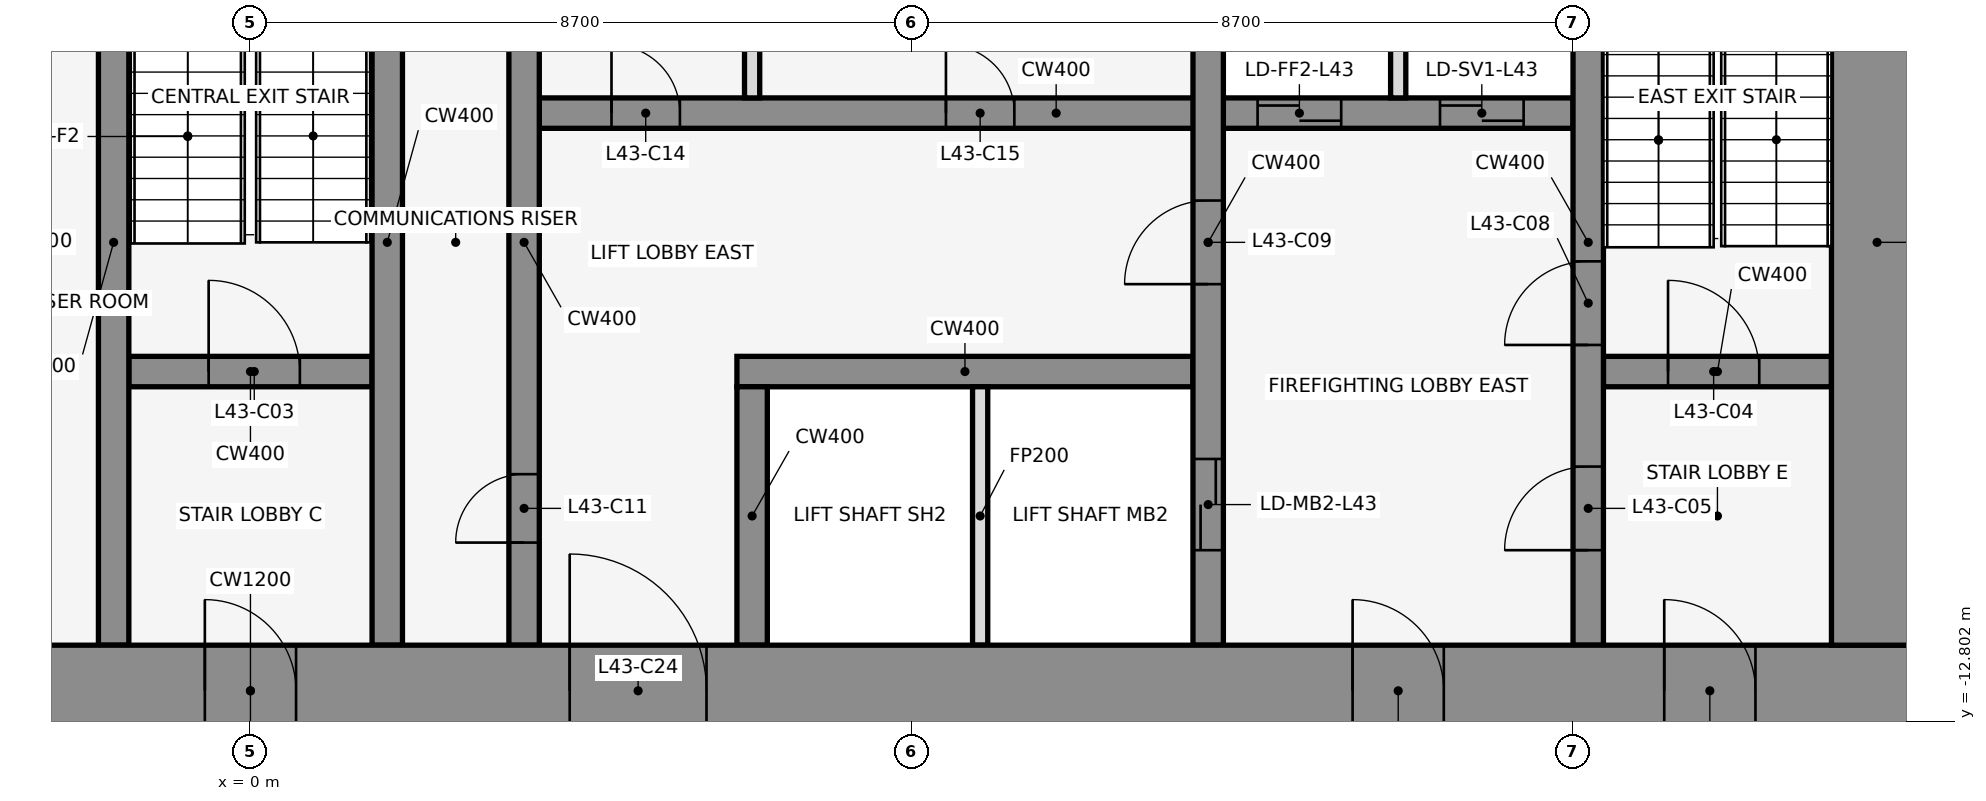
"""IFC4 building model, lengths in metres.
Left out: names, types, materials, properties, quantities, classifications, styles, units other than length and angle.
Written with IfcOpenShell. Run it as: python <this file> out.ifc"""

import sys

from ifc_helpers import new_model, si_unit, direction, frame, frame_2d, origin, place, context, subcontext, project, spatial, rectangle, extrude, element, fill, save


model = new_model("IFC4")
c1 = context("Model", 3, precision=1e-05, world=origin(), true_north=direction((0.0, 1.0)))
c2 = subcontext(c1, "Body", "Model", "MODEL_VIEW")
j1 = project(units=[si_unit("LENGTHUNIT", "METRE"), si_unit("PLANEANGLEUNIT", "RADIAN")], contexts=[c1])
p1 = place(None, origin())
s1 = spatial("IfcSite", under=j1, at=p1, CompositionType="ELEMENT")
p2 = place(p1, origin())
s2 = spatial("IfcBuilding", under=s1, at=p2, CompositionType="ELEMENT")
p3 = place(p2, frame((0.0, 0.0, 195.0)))
s3 = spatial("IfcBuildingStorey", under=s2, at=p3, CompositionType="ELEMENT", Elevation=195.0)
p4 = place(p3, frame((-1.6, -8.2, 0.0), z_axis=(0.0, 0.0, 1.0), x_axis=(1.0, 0.0, 0.0)))
e1 = element("IfcWall", 1, at=p4, inside=s3, PredefinedType="SHEAR", context=c2, shape_type="SweptSolid", body=[
    extrude(rectangle(XDim=3.2, YDim=0.4, at=frame_2d((1.6, 0.0))), origin(), (0.0, 0.0, 1.0), 4.1),
])
p5 = place(p4, frame((1.05, 0.0, 0.0)))
e2 = element("IfcOpeningElement", 2, at=p5, cuts=e1, PredefinedType="OPENING", context=c2, shape_type="SweptSolid", body=[
    extrude(rectangle(XDim=1.2, YDim=2.1, at=frame_2d((0.6, 1.05))), frame((0.0, 0.212, 0.0), z_axis=(0.0, -1.0, 0.0), x_axis=(1.0, 0.0, 0.0)), (0.0, 0.0, 1.0), 0.424),
])
p6 = place(p3, frame((6.4, -8.2, 0.0), z_axis=(0.0, 0.0, 1.0), x_axis=(1.0, 0.0, 0.0)))
e3 = element("IfcWall", 3, at=p6, inside=s3, PredefinedType="SHEAR", context=c2, shape_type="SweptSolid", body=[
    extrude(rectangle(XDim=6.0, YDim=0.4, at=frame_2d((3.0, 0.0))), origin(), (0.0, 0.0, 1.0), 4.1),
])
p7 = place(p3, frame((17.8, -8.2, 0.0), z_axis=(0.0, 0.0, 1.0), x_axis=(1.0, 0.0, 0.0)))
e4 = element("IfcWall", 4, at=p7, inside=s3, PredefinedType="SHEAR", context=c2, shape_type="SweptSolid", body=[
    extrude(rectangle(XDim=3.0, YDim=0.4, at=frame_2d((1.5, 0.0))), origin(), (0.0, 0.0, 1.0), 4.1),
])
p8 = place(p7, frame((0.85, 0.0, 0.0)))
e5 = element("IfcOpeningElement", 5, at=p8, cuts=e4, PredefinedType="OPENING", context=c2, shape_type="SweptSolid", body=[
    extrude(rectangle(XDim=1.2, YDim=2.1, at=frame_2d((0.6, 1.05))), frame((0.0, 0.212, 0.0), z_axis=(0.0, -1.0, 0.0), x_axis=(1.0, 0.0, 0.0)), (0.0, 0.0, 1.0), 0.424),
])
p9 = place(p3, frame((3.8, -4.8, 0.0), z_axis=(0.0, 0.0, 1.0), x_axis=(1.0, 0.0, 0.0)))
e6 = element("IfcWall", 6, at=p9, inside=s3, PredefinedType="SHEAR", context=c2, shape_type="SweptSolid", body=[
    extrude(rectangle(XDim=13.6, YDim=0.4, at=frame_2d((6.8, 0.0))), origin(), (0.0, 0.0, 1.0), 4.1),
])
p10 = place(p9, frame((9.45, 0.0, 0.0)))
e7 = element("IfcOpeningElement", 7, at=p10, cuts=e6, PredefinedType="OPENING", context=c2, shape_type="SweptSolid", body=[
    extrude(rectangle(XDim=1.1, YDim=2.1, at=frame_2d((0.55, 1.05))), frame((0.0, 0.212, 0.0), z_axis=(0.0, -1.0, 0.0), x_axis=(1.0, 0.0, 0.0)), (0.0, 0.0, 1.0), 0.424),
])
p11 = place(p9, frame((11.85, 0.0, 0.0)))
e8 = element("IfcOpeningElement", 8, at=p11, cuts=e6, PredefinedType="OPENING", context=c2, shape_type="SweptSolid", body=[
    extrude(rectangle(XDim=1.1, YDim=2.1, at=frame_2d((0.55, 1.05))), frame((0.0, 0.212, 0.0), z_axis=(0.0, -1.0, 0.0), x_axis=(1.0, 0.0, 0.0)), (0.0, 0.0, 1.0), 0.424),
])
p12 = place(p9, frame((0.95, 0.0, 0.0)))
e9 = element("IfcOpeningElement", 9, at=p12, cuts=e6, PredefinedType="OPENING", context=c2, shape_type="SweptSolid", body=[
    extrude(rectangle(XDim=0.9, YDim=2.1, at=frame_2d((0.45, 1.05))), frame((0.0, 0.212, 0.0), z_axis=(0.0, -1.0, 0.0), x_axis=(1.0, 0.0, 0.0)), (0.0, 0.0, 1.0), 0.424),
])
p13 = place(p9, frame((5.35, 0.0, 0.0)))
e10 = element("IfcOpeningElement", 10, at=p13, cuts=e6, PredefinedType="OPENING", context=c2, shape_type="SweptSolid", body=[
    extrude(rectangle(XDim=0.9, YDim=2.1, at=frame_2d((0.45, 1.05))), frame((0.0, 0.212, 0.0), z_axis=(0.0, -1.0, 0.0), x_axis=(1.0, 0.0, 0.0)), (0.0, 0.0, 1.0), 0.424),
])
for number, where, z_axis, x_axis in (
    (11, (-1.8, -11.8, 0.0), (0.0, 0.0, 1.0), (0.0, 1.0, 0.0)),
    (12, (1.8, -11.8, 0.0), (0.0, 0.0, 1.0), (0.0, 1.0, 0.0)),
):
    element("IfcWall", number, at=place(p3, frame(where, z_axis=z_axis, x_axis=x_axis)), inside=s3, PredefinedType="SHEAR", context=c2, shape_type="SweptSolid", body=[
        extrude(rectangle(XDim=10.6, YDim=0.4, at=frame_2d((5.3, 0.0))), origin(), (0.0, 0.0, 1.0), 4.1),
    ])
p14 = place(p3, frame((3.6, -11.8, 0.0), z_axis=(0.0, 0.0, 1.0), x_axis=(0.0, 1.0, 0.0)))
e13 = element("IfcWall", 13, at=p14, inside=s3, PredefinedType="SHEAR", context=c2, shape_type="SweptSolid", body=[
    extrude(rectangle(XDim=10.6, YDim=0.4, at=frame_2d((5.3, 0.0))), origin(), (0.0, 0.0, 1.0), 4.1),
])
p15 = place(p14, frame((1.35, 0.0, 0.0)))
e14 = element("IfcOpeningElement", 14, at=p15, cuts=e13, PredefinedType="OPENING", context=c2, shape_type="SweptSolid", body=[
    extrude(rectangle(XDim=0.9, YDim=2.1, at=frame_2d((0.45, 1.05))), frame((0.0, 0.212, 0.0), z_axis=(0.0, -1.0, 0.0), x_axis=(1.0, 0.0, 0.0)), (0.0, 0.0, 1.0), 0.424),
])
p16 = place(p3, frame((6.6, -11.8, 0.0), z_axis=(0.0, 0.0, 1.0), x_axis=(0.0, 1.0, 0.0)))
e15 = element("IfcWall", 15, at=p16, inside=s3, PredefinedType="SHEAR", context=c2, shape_type="SweptSolid", body=[
    extrude(rectangle(XDim=3.4, YDim=0.4, at=frame_2d((1.7, 0.0))), origin(), (0.0, 0.0, 1.0), 4.1),
])
for number, where, z_axis, x_axis in (
    (16, (6.6, -4.6, 0.0), (0.0, 0.0, 1.0), (0.0, 1.0, 0.0)),
    (17, (9.6, -11.8, 0.0), (0.0, 0.0, 1.0), (0.0, 1.0, 0.0)),
):
    element("IfcWall", number, at=place(p3, frame(where, z_axis=z_axis, x_axis=x_axis)), inside=s3, PredefinedType="PARTITIONING", context=c2, shape_type="SweptSolid", body=[
        extrude(rectangle(XDim=3.4, YDim=0.2, at=frame_2d((1.7, 0.0))), origin(), (0.0, 0.0, 1.0), 2.84),
    ])
p17 = place(p3, frame((12.6, -11.8, 0.0), z_axis=(0.0, 0.0, 1.0), x_axis=(0.0, 1.0, 0.0)))
e18 = element("IfcWall", 18, at=p17, inside=s3, PredefinedType="SHEAR", context=c2, shape_type="SweptSolid", body=[
    extrude(rectangle(XDim=10.6, YDim=0.4, at=frame_2d((5.3, 0.0))), origin(), (0.0, 0.0, 1.0), 4.1),
])
p18 = place(p17, frame((1.25, 0.0, 0.0)))
e19 = element("IfcOpeningElement", 19, at=p18, cuts=e18, PredefinedType="OPENING", context=c2, shape_type="SweptSolid", body=[
    extrude(rectangle(XDim=1.2, YDim=2.1, at=frame_2d((0.6, 1.05))), frame((0.0, 0.212, 0.0), z_axis=(0.0, -1.0, 0.0), x_axis=(1.0, 0.0, 0.0)), (0.0, 0.0, 1.0), 0.424),
])
p19 = place(p17, frame((4.75, 0.0, 0.0)))
e20 = element("IfcOpeningElement", 20, at=p19, cuts=e18, PredefinedType="OPENING", context=c2, shape_type="SweptSolid", body=[
    extrude(rectangle(XDim=1.1, YDim=2.1, at=frame_2d((0.55, 1.05))), frame((0.0, 0.212, 0.0), z_axis=(0.0, -1.0, 0.0), x_axis=(1.0, 0.0, 0.0)), (0.0, 0.0, 1.0), 0.424),
])
p20 = place(p3, frame((15.1, -4.6, 0.0), z_axis=(0.0, 0.0, 1.0), x_axis=(0.0, 1.0, 0.0)))
e21 = element("IfcWall", 21, at=p20, inside=s3, PredefinedType="PARTITIONING", context=c2, shape_type="SweptSolid", body=[
    extrude(rectangle(XDim=3.4, YDim=0.2, at=frame_2d((1.7, 0.0))), origin(), (0.0, 0.0, 1.0), 2.84),
])
p21 = place(p3, frame((17.6, -11.8, 0.0), z_axis=(0.0, 0.0, 1.0), x_axis=(0.0, 1.0, 0.0)))
e22 = element("IfcWall", 22, at=p21, inside=s3, PredefinedType="SHEAR", context=c2, shape_type="SweptSolid", body=[
    extrude(rectangle(XDim=10.6, YDim=0.4, at=frame_2d((5.3, 0.0))), origin(), (0.0, 0.0, 1.0), 4.1),
])
p22 = place(p21, frame((1.25, 0.0, 0.0)))
e23 = element("IfcOpeningElement", 23, at=p22, cuts=e22, PredefinedType="OPENING", context=c2, shape_type="SweptSolid", body=[
    extrude(rectangle(XDim=1.1, YDim=2.1, at=frame_2d((0.55, 1.05))), frame((0.0, 0.212, 0.0), z_axis=(0.0, -1.0, 0.0), x_axis=(1.0, 0.0, 0.0)), (0.0, 0.0, 1.0), 0.424),
])
p23 = place(p21, frame((3.95, 0.0, 0.0)))
e24 = element("IfcOpeningElement", 24, at=p23, cuts=e22, PredefinedType="OPENING", context=c2, shape_type="SweptSolid", body=[
    extrude(rectangle(XDim=1.1, YDim=2.1, at=frame_2d((0.55, 1.05))), frame((0.0, 0.212, 0.0), z_axis=(0.0, -1.0, 0.0), x_axis=(1.0, 0.0, 0.0)), (0.0, 0.0, 1.0), 0.424),
])
p24 = place(p3, frame((-22.0, -12.4, 0.0), z_axis=(0.0, 0.0, 1.0), x_axis=(1.0, 0.0, 0.0)))
e25 = element("IfcWall", 25, at=p24, inside=s3, PredefinedType="SHEAR", context=c2, shape_type="SweptSolid", body=[
    extrude(rectangle(XDim=44.0, YDim=1.2, at=frame_2d((22.0, 0.0))), origin(), (0.0, 0.0, 1.0), 4.1),
])
p25 = place(p24, frame((2.2, 0.0, 0.0)))
e26 = element("IfcOpeningElement", 26, at=p25, cuts=e25, PredefinedType="OPENING", context=c2, shape_type="SweptSolid", body=[
    extrude(rectangle(XDim=1.2, YDim=2.1, at=frame_2d((0.6, 1.05))), frame((0.0, 0.612, 0.0), z_axis=(0.0, -1.0, 0.0), x_axis=(1.0, 0.0, 0.0)), (0.0, 0.0, 1.0), 1.224),
])
p26 = place(p24, frame((21.4, 0.0, 0.0)))
e27 = element("IfcOpeningElement", 27, at=p26, cuts=e25, PredefinedType="OPENING", context=c2, shape_type="SweptSolid", body=[
    extrude(rectangle(XDim=1.2, YDim=2.1, at=frame_2d((0.6, 1.05))), frame((0.0, 0.612, 0.0), z_axis=(0.0, -1.0, 0.0), x_axis=(1.0, 0.0, 0.0)), (0.0, 0.0, 1.0), 1.224),
])
p27 = place(p24, frame((40.6, 0.0, 0.0)))
e28 = element("IfcOpeningElement", 28, at=p27, cuts=e25, PredefinedType="OPENING", context=c2, shape_type="SweptSolid", body=[
    extrude(rectangle(XDim=1.2, YDim=2.1, at=frame_2d((0.6, 1.05))), frame((0.0, 0.612, 0.0), z_axis=(0.0, -1.0, 0.0), x_axis=(1.0, 0.0, 0.0)), (0.0, 0.0, 1.0), 1.224),
])
p28 = place(p24, frame((16.0, 0.0, 0.0)))
e29 = element("IfcOpeningElement", 29, at=p28, cuts=e25, PredefinedType="OPENING", context=c2, shape_type="SweptSolid", body=[
    extrude(rectangle(XDim=1.8, YDim=2.1, at=frame_2d((0.9, 1.05))), frame((0.0, 0.612, 0.0), z_axis=(0.0, -1.0, 0.0), x_axis=(1.0, 0.0, 0.0)), (0.0, 0.0, 1.0), 1.224),
])
p29 = place(p24, frame((6.3, 0.0, 0.0)))
e30 = element("IfcOpeningElement", 30, at=p29, cuts=e25, PredefinedType="OPENING", context=c2, shape_type="SweptSolid", body=[
    extrude(rectangle(XDim=1.2, YDim=2.1, at=frame_2d((0.6, 1.05))), frame((0.0, 0.612, 0.0), z_axis=(0.0, -1.0, 0.0), x_axis=(1.0, 0.0, 0.0)), (0.0, 0.0, 1.0), 1.224),
])
p30 = place(p24, frame((26.2, 0.0, 0.0)))
e31 = element("IfcOpeningElement", 31, at=p30, cuts=e25, PredefinedType="OPENING", context=c2, shape_type="SweptSolid", body=[
    extrude(rectangle(XDim=1.8, YDim=2.1, at=frame_2d((0.9, 1.05))), frame((0.0, 0.612, 0.0), z_axis=(0.0, -1.0, 0.0), x_axis=(1.0, 0.0, 0.0)), (0.0, 0.0, 1.0), 1.224),
])
p31 = place(p24, frame((36.5, 0.0, 0.0)))
e32 = element("IfcOpeningElement", 32, at=p31, cuts=e25, PredefinedType="OPENING", context=c2, shape_type="SweptSolid", body=[
    extrude(rectangle(XDim=1.2, YDim=2.1, at=frame_2d((0.6, 1.05))), frame((0.0, 0.612, 0.0), z_axis=(0.0, -1.0, 0.0), x_axis=(1.0, 0.0, 0.0)), (0.0, 0.0, 1.0), 1.224),
])
p32 = place(p3, frame((21.4, -11.8, 0.0), z_axis=(0.0, 0.0, 1.0), x_axis=(0.0, 1.0, 0.0)))
e33 = element("IfcWall", 33, at=p32, inside=s3, PredefinedType="SHEAR", context=c2, shape_type="SweptSolid", body=[
    extrude(rectangle(XDim=10.6, YDim=1.2, at=frame_2d((5.3, 0.0))), origin(), (0.0, 0.0, 1.0), 4.1),
])
p33 = place(p5, origin())
e34 = element("IfcDoor", 34, at=p33, inside=s3, OperationType="SINGLE_SWING_LEFT", PredefinedType="DOOR", context=c2, shape_type="SweptSolid", body=[
    extrude(rectangle(XDim=1.2, YDim=2.1, at=frame_2d((0.6, 1.05))), frame((0.0, 0.025, 0.0), z_axis=(0.0, -1.0, 0.0), x_axis=(1.0, 0.0, 0.0)), (0.0, 0.0, 1.0), 0.05),
])
fill(e2, e34)
p34 = place(p8, origin())
e35 = element("IfcDoor", 35, at=p34, inside=s3, OperationType="SINGLE_SWING_RIGHT", PredefinedType="DOOR", context=c2, shape_type="SweptSolid", body=[
    extrude(rectangle(XDim=1.2, YDim=2.1, at=frame_2d((0.6, 1.05))), frame((0.0, 0.025, 0.0), z_axis=(0.0, -1.0, 0.0), x_axis=(1.0, 0.0, 0.0)), (0.0, 0.0, 1.0), 0.05),
])
fill(e5, e35)
p35 = place(p22, origin())
e36 = element("IfcDoor", 36, at=p35, inside=s3, OperationType="SINGLE_SWING_LEFT", PredefinedType="DOOR", context=c2, shape_type="SweptSolid", body=[
    extrude(rectangle(XDim=1.1, YDim=2.1, at=frame_2d((0.55, 1.05))), frame((0.0, 0.025, 0.0), z_axis=(0.0, -1.0, 0.0), x_axis=(1.0, 0.0, 0.0)), (0.0, 0.0, 1.0), 0.05),
])
fill(e23, e36)
p36 = place(p18, origin())
e37 = element("IfcDoor", 37, at=p36, inside=s3, OperationType="DOUBLE_DOOR_SLIDING", PredefinedType="DOOR", context=c2, shape_type="SweptSolid", body=[
    extrude(rectangle(XDim=1.2, YDim=2.1, at=frame_2d((0.6, 1.05))), frame((0.0, 0.025, 0.0), z_axis=(0.0, -1.0, 0.0), x_axis=(1.0, 0.0, 0.0)), (0.0, 0.0, 1.0), 0.05),
])
fill(e19, e37)
p37 = place(p10, origin())
e38 = element("IfcDoor", 38, at=p37, inside=s3, OperationType="DOUBLE_DOOR_SLIDING", PredefinedType="DOOR", context=c2, shape_type="SweptSolid", body=[
    extrude(rectangle(XDim=1.1, YDim=2.1, at=frame_2d((0.55, 1.05))), frame((0.0, 0.025, 0.0), z_axis=(0.0, -1.0, 0.0), x_axis=(1.0, 0.0, 0.0)), (0.0, 0.0, 1.0), 0.05),
])
fill(e7, e38)
p38 = place(p11, origin())
e39 = element("IfcDoor", 39, at=p38, inside=s3, OperationType="DOUBLE_DOOR_SLIDING", PredefinedType="DOOR", context=c2, shape_type="SweptSolid", body=[
    extrude(rectangle(XDim=1.1, YDim=2.1, at=frame_2d((0.55, 1.05))), frame((0.0, 0.025, 0.0), z_axis=(0.0, -1.0, 0.0), x_axis=(1.0, 0.0, 0.0)), (0.0, 0.0, 1.0), 0.05),
])
fill(e8, e39)
p39 = place(p23, origin())
e40 = element("IfcDoor", 40, at=p39, inside=s3, OperationType="SINGLE_SWING_RIGHT", PredefinedType="DOOR", context=c2, shape_type="SweptSolid", body=[
    extrude(rectangle(XDim=1.1, YDim=2.1, at=frame_2d((0.55, 1.05))), frame((0.0, 0.025, 0.0), z_axis=(0.0, -1.0, 0.0), x_axis=(1.0, 0.0, 0.0)), (0.0, 0.0, 1.0), 0.05),
])
fill(e24, e40)
p40 = place(p19, frame((1.1, 0.0, 0.0), z_axis=(0.0, 0.0, 1.0), x_axis=(-1.0, 0.0, 0.0)))
e41 = element("IfcDoor", 41, at=p40, inside=s3, OperationType="SINGLE_SWING_RIGHT", PredefinedType="DOOR", context=c2, shape_type="SweptSolid", body=[
    extrude(rectangle(XDim=1.1, YDim=2.1, at=frame_2d((0.55, 1.05))), frame((0.0, 0.025, 0.0), z_axis=(0.0, -1.0, 0.0), x_axis=(1.0, 0.0, 0.0)), (0.0, 0.0, 1.0), 0.05),
])
fill(e20, e41)
p41 = place(p15, origin())
e42 = element("IfcDoor", 42, at=p41, inside=s3, OperationType="SINGLE_SWING_LEFT", PredefinedType="DOOR", context=c2, shape_type="SweptSolid", body=[
    extrude(rectangle(XDim=0.9, YDim=2.1, at=frame_2d((0.45, 1.05))), frame((0.0, 0.025, 0.0), z_axis=(0.0, -1.0, 0.0), x_axis=(1.0, 0.0, 0.0)), (0.0, 0.0, 1.0), 0.05),
])
fill(e14, e42)
p42 = place(p12, origin())
e43 = element("IfcDoor", 43, at=p42, inside=s3, OperationType="SINGLE_SWING_RIGHT", PredefinedType="DOOR", context=c2, shape_type="SweptSolid", body=[
    extrude(rectangle(XDim=0.9, YDim=2.1, at=frame_2d((0.45, 1.05))), frame((0.0, 0.025, 0.0), z_axis=(0.0, -1.0, 0.0), x_axis=(1.0, 0.0, 0.0)), (0.0, 0.0, 1.0), 0.05),
])
fill(e9, e43)
p43 = place(p13, origin())
e44 = element("IfcDoor", 44, at=p43, inside=s3, OperationType="SINGLE_SWING_LEFT", PredefinedType="DOOR", context=c2, shape_type="SweptSolid", body=[
    extrude(rectangle(XDim=0.9, YDim=2.1, at=frame_2d((0.45, 1.05))), frame((0.0, 0.025, 0.0), z_axis=(0.0, -1.0, 0.0), x_axis=(1.0, 0.0, 0.0)), (0.0, 0.0, 1.0), 0.05),
])
fill(e10, e44)
p44 = place(p26, frame((1.2, 0.0, 0.0), z_axis=(0.0, 0.0, 1.0), x_axis=(-1.0, 0.0, 0.0)))
e45 = element("IfcDoor", 45, at=p44, inside=s3, OperationType="SINGLE_SWING_RIGHT", PredefinedType="DOOR", context=c2, shape_type="SweptSolid", body=[
    extrude(rectangle(XDim=1.2, YDim=2.1, at=frame_2d((0.6, 1.05))), frame((0.0, 0.025, 0.0), z_axis=(0.0, -1.0, 0.0), x_axis=(1.0, 0.0, 0.0)), (0.0, 0.0, 1.0), 0.05),
])
fill(e27, e45)
p45 = place(p27, frame((1.2, 0.0, 0.0), z_axis=(0.0, 0.0, 1.0), x_axis=(-1.0, 0.0, 0.0)))
e46 = element("IfcDoor", 46, at=p45, inside=s3, OperationType="SINGLE_SWING_RIGHT", PredefinedType="DOOR", context=c2, shape_type="SweptSolid", body=[
    extrude(rectangle(XDim=1.2, YDim=2.1, at=frame_2d((0.6, 1.05))), frame((0.0, 0.025, 0.0), z_axis=(0.0, -1.0, 0.0), x_axis=(1.0, 0.0, 0.0)), (0.0, 0.0, 1.0), 0.05),
])
fill(e28, e46)
p46 = place(p30, origin())
e47 = element("IfcDoor", 47, at=p46, inside=s3, OperationType="SINGLE_SWING_LEFT", PredefinedType="DOOR", context=c2, shape_type="SweptSolid", body=[
    extrude(rectangle(XDim=1.8, YDim=2.1, at=frame_2d((0.9, 1.05))), frame((0.0, 0.025, 0.0), z_axis=(0.0, -1.0, 0.0), x_axis=(1.0, 0.0, 0.0)), (0.0, 0.0, 1.0), 0.05),
])
fill(e31, e47)
p47 = place(p31, frame((1.2, 0.0, 0.0), z_axis=(0.0, 0.0, 1.0), x_axis=(-1.0, 0.0, 0.0)))
e48 = element("IfcDoor", 48, at=p47, inside=s3, OperationType="SINGLE_SWING_RIGHT", PredefinedType="DOOR", context=c2, shape_type="SweptSolid", body=[
    extrude(rectangle(XDim=1.2, YDim=2.1, at=frame_2d((0.6, 1.05))), frame((0.0, 0.025, 0.0), z_axis=(0.0, -1.0, 0.0), x_axis=(1.0, 0.0, 0.0)), (0.0, 0.0, 1.0), 0.05),
])
fill(e32, e48)
save(model, sys.argv[1])
